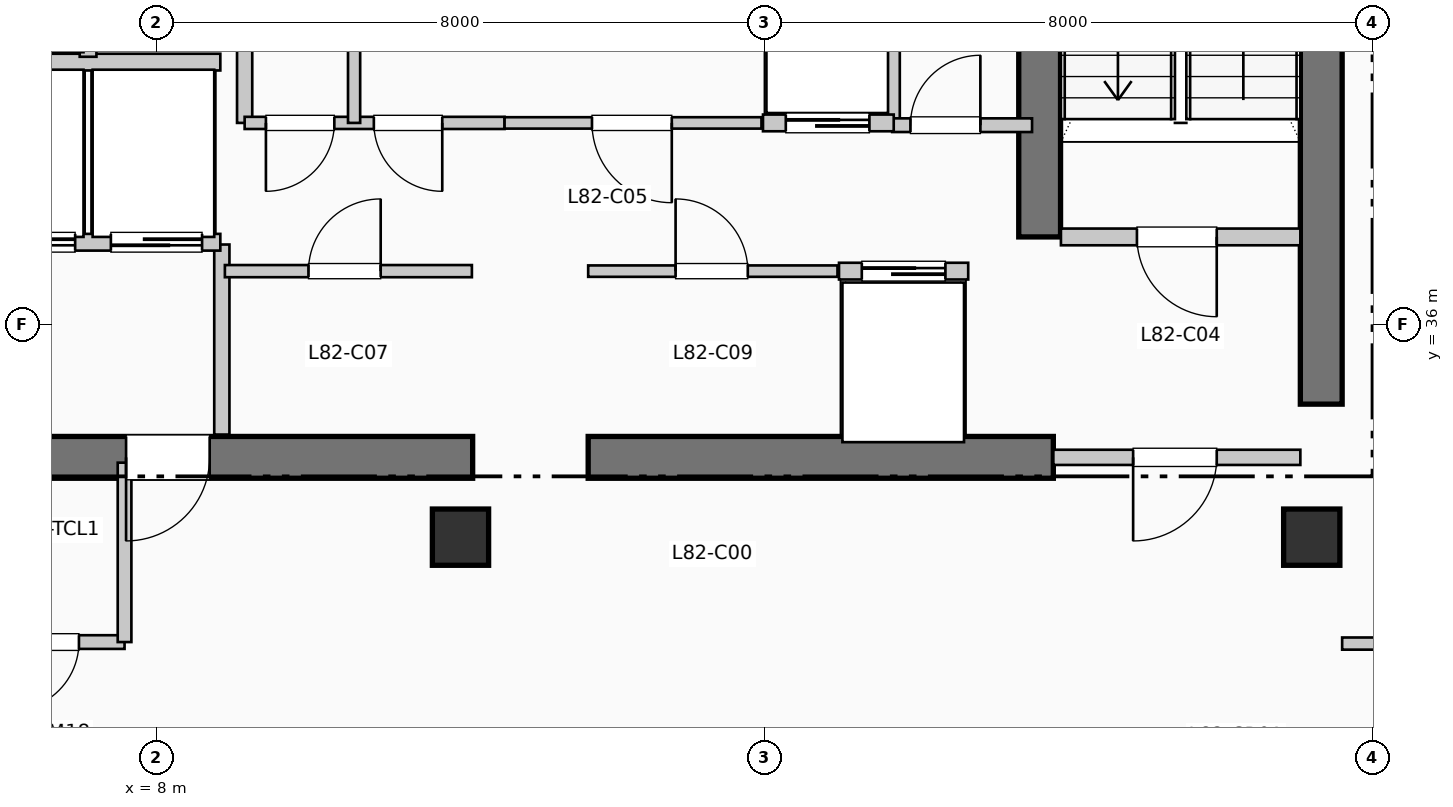
"""IFC4 building model, lengths in metres.
Left out: names, types, materials, properties, quantities, classifications, styles, units other than length and angle.
Written with IfcOpenShell. Run it as: python <this file> out.ifc"""

import sys

from ifc_helpers import new_model, si_unit, direction, frame, frame_2d, origin, origin_2d, place, context, subcontext, project, spatial, rectangle, extrude, element, fill, save


model = new_model("IFC4")
c1 = context("Model", 3, precision=1e-05, world=origin(), true_north=direction((0.0, 1.0)))
c2 = subcontext(c1, "Body", "Model", "MODEL_VIEW")
j1 = project(units=[si_unit("LENGTHUNIT", "METRE"), si_unit("PLANEANGLEUNIT", "RADIAN")], contexts=[c1])
p1 = place(None, origin())
s1 = spatial("IfcSite", under=j1, at=p1, CompositionType="ELEMENT")
p2 = place(p1, origin())
s2 = spatial("IfcBuilding", under=s1, at=p2, CompositionType="ELEMENT")
p3 = place(p2, frame((0.0, 0.0, 335.61)))
s3 = spatial("IfcBuildingStorey", under=s2, at=p3, CompositionType="ELEMENT", Elevation=335.61)
p4 = place(p3, frame((23.325, 34.95, 0.0), z_axis=(0.0, 0.0, 1.0), x_axis=(0.0, 1.0, 0.0)))
e1 = element("IfcWall", 1, at=p4, inside=s3, PredefinedType="SHEAR", context=c2, shape_type="SweptSolid", body=[
    extrude(rectangle(XDim=10.64, YDim=0.55, at=frame_2d((5.32, 0.0))), origin(), (0.0, 0.0, 1.0), 3.96),
])
p5 = place(p3, frame((1.45, 34.25, 0.0), z_axis=(0.0, 0.0, 1.0), x_axis=(1.0, 0.0, 0.0)))
e2 = element("IfcWall", 2, at=p5, inside=s3, PredefinedType="SHEAR", context=c2, shape_type="SweptSolid", body=[
    extrude(rectangle(XDim=10.71, YDim=0.55, at=frame_2d((5.355, 0.0))), origin(), (0.0, 0.0, 1.0), 3.96),
])
p6 = place(p5, frame((7.25, 0.0, 0.0), z_axis=(0.0, 0.0, 1.0), x_axis=(-1.0, 0.0, 0.0)))
e3 = element("IfcOpeningElement", 3, at=p6, cuts=e2, PredefinedType="OPENING", context=c2, shape_type="SweptSolid", body=[
    extrude(rectangle(XDim=1.1, YDim=2.15, at=frame_2d((0.55, 1.075))), frame((0.0, 0.285, 0.0), z_axis=(0.0, -1.0, 0.0), x_axis=(1.0, 0.0, 0.0)), (0.0, 0.0, 1.0), 0.57),
])
p7 = place(p3, frame((13.68, 34.25, 0.0), z_axis=(0.0, 0.0, 1.0), x_axis=(1.0, 0.0, 0.0)))
e4 = element("IfcWall", 4, at=p7, inside=s3, PredefinedType="SHEAR", context=c2, shape_type="SweptSolid", body=[
    extrude(rectangle(XDim=6.12, YDim=0.55, at=frame_2d((3.06, 0.0))), origin(), (0.0, 0.0, 1.0), 3.96),
])
p8 = place(p3, frame((19.62, 37.15, 0.0), z_axis=(0.0, 0.0, 1.0), x_axis=(0.0, 1.0, 0.0)))
e5 = element("IfcWall", 5, at=p8, inside=s3, PredefinedType="SHEAR", context=c2, shape_type="SweptSolid", body=[
    extrude(rectangle(XDim=7.89, YDim=0.55, at=frame_2d((3.945, 0.0))), origin(), (0.0, 0.0, 1.0), 3.96),
])
for number, where, z_axis, x_axis in (
    (6, (12.0, 33.2, 0.0), (0.0, 0.0, 1.0), (1.0, 0.0, 0.0)),
    (7, (23.2, 33.2, 0.0), (0.0, 0.0, 1.0), (1.0, 0.0, 0.0)),
):
    element("IfcColumn", number, at=place(p3, frame(where, z_axis=z_axis, x_axis=x_axis)), inside=s3, PredefinedType="COLUMN", context=c2, shape_type="SweptSolid", body=[
        extrude(rectangle(XDim=0.74, YDim=0.74, at=origin_2d()), origin(), (0.0, 0.0, 1.0), 3.96),
    ])
p9 = place(p3, frame((8.86, 34.55, 0.0), z_axis=(0.0, 0.0, 1.0), x_axis=(0.0, 1.0, 0.0)))
e8 = element("IfcWall", 8, at=p9, inside=s3, PredefinedType="PARTITIONING", context=c2, shape_type="SweptSolid", body=[
    extrude(rectangle(XDim=2.5, YDim=0.2, at=frame_2d((1.25, 0.0))), origin(), (0.0, 0.0, 1.0), 3.74),
])
p10 = place(p3, frame((19.9, 37.15, 0.0), z_axis=(0.0, 0.0, 1.0), x_axis=(1.0, 0.0, 0.0)))
e9 = element("IfcWall", 9, at=p10, inside=s3, PredefinedType="PARTITIONING", context=c2, shape_type="SweptSolid", body=[
    extrude(rectangle(XDim=3.15, YDim=0.22, at=frame_2d((1.575, 0.0))), origin(), (0.0, 0.0, 1.0), 3.74),
])
p11 = place(p10, frame((2.05, 0.0, 0.0), z_axis=(0.0, 0.0, 1.0), x_axis=(-1.0, 0.0, 0.0)))
e10 = element("IfcOpeningElement", 10, at=p11, cuts=e9, PredefinedType="OPENING", context=c2, shape_type="SweptSolid", body=[
    extrude(rectangle(XDim=1.05, YDim=2.15, at=frame_2d((0.525, 1.075))), frame((0.0, 0.12, 0.0), z_axis=(0.0, -1.0, 0.0), x_axis=(1.0, 0.0, 0.0)), (0.0, 0.0, 1.0), 0.24),
])
p12 = place(p3, frame((19.8, 34.25, 0.0), z_axis=(0.0, 0.0, 1.0), x_axis=(1.0, 0.0, 0.0)))
e11 = element("IfcWall", 11, at=p12, inside=s3, PredefinedType="PARTITIONING", context=c2, shape_type="SweptSolid", body=[
    extrude(rectangle(XDim=3.25, YDim=0.2, at=frame_2d((1.625, 0.0))), origin(), (0.0, 0.0, 1.0), 3.74),
])
p13 = place(p12, frame((2.15, 0.0, 0.0), z_axis=(0.0, 0.0, 1.0), x_axis=(-1.0, 0.0, 0.0)))
e12 = element("IfcOpeningElement", 12, at=p13, cuts=e11, PredefinedType="OPENING", context=c2, shape_type="SweptSolid", body=[
    extrude(rectangle(XDim=1.1, YDim=2.15, at=frame_2d((0.55, 1.075))), frame((0.0, 0.11, 0.0), z_axis=(0.0, -1.0, 0.0), x_axis=(1.0, 0.0, 0.0)), (0.0, 0.0, 1.0), 0.22),
])
p14 = place(p3, frame((5.38, 37.08, 0.0), z_axis=(0.0, 0.0, 1.0), x_axis=(1.0, 0.0, 0.0)))
e13 = element("IfcWall", 13, at=p14, inside=s3, PredefinedType="PARTITIONING", context=c2, shape_type="SweptSolid", body=[
    extrude(rectangle(XDim=3.46, YDim=0.22, at=frame_2d((1.73, 0.0))), origin(), (0.0, 0.0, 1.0), 3.74),
])
p15 = place(p14, frame((1.55, 0.0, 0.0), z_axis=(0.0, 0.0, 1.0), x_axis=(-1.0, 0.0, 0.0)))
e14 = element("IfcOpeningElement", 14, at=p15, cuts=e13, PredefinedType="OPENING", context=c2, shape_type="SweptSolid", body=[
    extrude(rectangle(XDim=1.2, YDim=2.2, at=frame_2d((0.6, 1.1))), frame((0.0, 0.12, 0.0), z_axis=(0.0, -1.0, 0.0), x_axis=(1.0, 0.0, 0.0)), (0.0, 0.0, 1.0), 0.24),
])
p16 = place(p14, frame((3.22, 0.0, 0.0), z_axis=(0.0, 0.0, 1.0), x_axis=(-1.0, 0.0, 0.0)))
e15 = element("IfcOpeningElement", 15, at=p16, cuts=e13, PredefinedType="OPENING", context=c2, shape_type="SweptSolid", body=[
    extrude(rectangle(XDim=1.2, YDim=2.2, at=frame_2d((0.6, 1.1))), frame((0.0, 0.12, 0.0), z_axis=(0.0, -1.0, 0.0), x_axis=(1.0, 0.0, 0.0)), (0.0, 0.0, 1.0), 0.24),
])
p17 = place(p3, frame((5.38, 39.45, 0.0), z_axis=(0.0, 0.0, 1.0), x_axis=(1.0, 0.0, 0.0)))
e16 = element("IfcWall", 16, at=p17, inside=s3, PredefinedType="PARTITIONING", context=c2, shape_type="SweptSolid", body=[
    extrude(rectangle(XDim=3.46, YDim=0.22, at=frame_2d((1.73, 0.0))), origin(), (0.0, 0.0, 1.0), 3.74),
])
p18 = place(p3, frame((7.1, 39.52, 0.0), z_axis=(0.0, 0.0, 1.0), x_axis=(0.0, 1.0, 0.0)))
e17 = element("IfcWall", 17, at=p18, inside=s3, PredefinedType="PARTITIONING", context=c2, shape_type="SweptSolid", body=[
    extrude(rectangle(XDim=2.93, YDim=0.22, at=frame_2d((1.465, 0.0))), origin(), (0.0, 0.0, 1.0), 3.74),
])
p19 = place(p18, frame((0.85, 0.0, 0.0)))
e18 = element("IfcOpeningElement", 18, at=p19, cuts=e17, PredefinedType="OPENING", context=c2, shape_type="SweptSolid", body=[
    extrude(rectangle(XDim=1.1, YDim=2.2, at=frame_2d((0.55, 1.1))), frame((0.0, 0.12, 0.0), z_axis=(0.0, -1.0, 0.0), x_axis=(1.0, 0.0, 0.0)), (0.0, 0.0, 1.0), 0.24),
])
for number, where, z_axis, x_axis in (
    (19, (9.16, 38.65, 0.0), (0.0, 0.0, 1.0), (0.0, 1.0, 0.0)),
    (20, (17.68, 38.65, 0.0), (0.0, 0.0, 1.0), (0.0, 1.0, 0.0)),
):
    element("IfcWall", number, at=place(p3, frame(where, z_axis=z_axis, x_axis=x_axis)), inside=s3, PredefinedType="PARTITIONING", context=c2, shape_type="SweptSolid", body=[
        extrude(rectangle(XDim=2.35, YDim=0.2, at=frame_2d((1.175, 0.0))), origin(), (0.0, 0.0, 1.0), 3.74),
    ])
p20 = place(p3, frame((17.68, 38.62, 0.0), z_axis=(0.0, 0.0, 1.0), x_axis=(1.0, 0.0, 0.0)))
e21 = element("IfcWall", 21, at=p20, inside=s3, PredefinedType="PARTITIONING", context=c2, shape_type="SweptSolid", body=[
    extrude(rectangle(XDim=1.84, YDim=0.18, at=frame_2d((0.92, 0.0))), origin(), (0.0, 0.0, 1.0), 3.74),
])
p21 = place(p20, frame((0.24, 0.0, 0.0)))
e22 = element("IfcOpeningElement", 22, at=p21, cuts=e21, PredefinedType="OPENING", context=c2, shape_type="SweptSolid", body=[
    extrude(rectangle(XDim=0.92, YDim=2.1, at=frame_2d((0.46, 1.05))), frame((0.0, 0.1, 0.0), z_axis=(0.0, -1.0, 0.0), x_axis=(1.0, 0.0, 0.0)), (0.0, 0.0, 1.0), 0.2),
])
p22 = place(p3, frame((5.5, 31.82, 0.0), z_axis=(0.0, 0.0, 1.0), x_axis=(1.0, 0.0, 0.0)))
e23 = element("IfcWall", 23, at=p22, inside=s3, PredefinedType="PLUMBINGWALL", context=c2, shape_type="SweptSolid", body=[
    extrude(rectangle(XDim=2.08, YDim=0.18, at=frame_2d((1.04, 0.0))), origin(), (0.0, 0.0, 1.0), 3.74),
])
p23 = place(p22, frame((1.48, 0.0, 0.0), z_axis=(0.0, 0.0, 1.0), x_axis=(-1.0, 0.0, 0.0)))
e24 = element("IfcOpeningElement", 24, at=p23, cuts=e23, PredefinedType="OPENING", context=c2, shape_type="SweptSolid", body=[
    extrude(rectangle(XDim=0.9, YDim=2.1, at=frame_2d((0.45, 1.05))), frame((0.0, 0.1, 0.0), z_axis=(0.0, -1.0, 0.0), x_axis=(1.0, 0.0, 0.0)), (0.0, 0.0, 1.0), 0.2),
])
p24 = place(p3, frame((7.58, 31.82, 0.0), z_axis=(0.0, 0.0, 1.0), x_axis=(0.0, 1.0, 0.0)))
e25 = element("IfcWall", 25, at=p24, inside=s3, PredefinedType="PLUMBINGWALL", context=c2, shape_type="SweptSolid", body=[
    extrude(rectangle(XDim=2.36, YDim=0.18, at=frame_2d((1.18, 0.0))), origin(), (0.0, 0.0, 1.0), 3.74),
])
p25 = place(p3, frame((8.9, 36.7, 0.0), z_axis=(0.0, 0.0, 1.0), x_axis=(1.0, 0.0, 0.0)))
e26 = element("IfcWall", 26, at=p25, inside=s3, PredefinedType="PARTITIONING", context=c2, shape_type="SweptSolid", body=[
    extrude(rectangle(XDim=3.25, YDim=0.16, at=frame_2d((1.625, 0.0))), origin(), (0.0, 0.0, 1.0), 3.74),
])
p26 = place(p25, frame((1.1, 0.0, 0.0)))
e27 = element("IfcOpeningElement", 27, at=p26, cuts=e26, PredefinedType="OPENING", context=c2, shape_type="SweptSolid", body=[
    extrude(rectangle(XDim=0.95, YDim=2.15, at=frame_2d((0.475, 1.075))), frame((0.0, 0.09, 0.0), z_axis=(0.0, -1.0, 0.0), x_axis=(1.0, 0.0, 0.0)), (0.0, 0.0, 1.0), 0.18),
])
p27 = place(p3, frame((9.16, 38.65, 0.0), z_axis=(0.0, 0.0, 1.0), x_axis=(1.0, 0.0, 0.0)))
e28 = element("IfcWall", 28, at=p27, inside=s3, PredefinedType="PARTITIONING", context=c2, shape_type="SweptSolid", body=[
    extrude(rectangle(XDim=3.42, YDim=0.16, at=frame_2d((1.71, 0.0))), origin(), (0.0, 0.0, 1.0), 3.74),
])
p28 = place(p27, frame((1.18, 0.0, 0.0), z_axis=(0.0, 0.0, 1.0), x_axis=(-1.0, 0.0, 0.0)))
e29 = element("IfcOpeningElement", 29, at=p28, cuts=e28, PredefinedType="OPENING", context=c2, shape_type="SweptSolid", body=[
    extrude(rectangle(XDim=0.9, YDim=2.15, at=frame_2d((0.45, 1.075))), frame((0.0, 0.09, 0.0), z_axis=(0.0, -1.0, 0.0), x_axis=(1.0, 0.0, 0.0)), (0.0, 0.0, 1.0), 0.18),
])
p29 = place(p27, frame((2.6, 0.0, 0.0), z_axis=(0.0, 0.0, 1.0), x_axis=(-1.0, 0.0, 0.0)))
e30 = element("IfcOpeningElement", 30, at=p29, cuts=e28, PredefinedType="OPENING", context=c2, shape_type="SweptSolid", body=[
    extrude(rectangle(XDim=0.9, YDim=2.15, at=frame_2d((0.45, 1.075))), frame((0.0, 0.09, 0.0), z_axis=(0.0, -1.0, 0.0), x_axis=(1.0, 0.0, 0.0)), (0.0, 0.0, 1.0), 0.18),
])
p30 = place(p3, frame((10.6, 38.65, 0.0), z_axis=(0.0, 0.0, 1.0), x_axis=(0.0, 1.0, 0.0)))
e31 = element("IfcWall", 31, at=p30, inside=s3, PredefinedType="PARTITIONING", context=c2, shape_type="SweptSolid", body=[
    extrude(rectangle(XDim=2.35, YDim=0.16, at=frame_2d((1.175, 0.0))), origin(), (0.0, 0.0, 1.0), 3.74),
])
p31 = place(p3, frame((13.68, 36.7, 0.0), z_axis=(0.0, 0.0, 1.0), x_axis=(1.0, 0.0, 0.0)))
e32 = element("IfcWall", 32, at=p31, inside=s3, PredefinedType="PARTITIONING", context=c2, shape_type="SweptSolid", body=[
    extrude(rectangle(XDim=3.28, YDim=0.15, at=frame_2d((1.64, 0.0))), origin(), (0.0, 0.0, 1.0), 3.74),
])
p32 = place(p31, frame((1.15, 0.0, 0.0)))
e33 = element("IfcOpeningElement", 33, at=p32, cuts=e32, PredefinedType="OPENING", context=c2, shape_type="SweptSolid", body=[
    extrude(rectangle(XDim=0.95, YDim=2.15, at=frame_2d((0.475, 1.075))), frame((0.0, 0.085, 0.0), z_axis=(0.0, -1.0, 0.0), x_axis=(1.0, 0.0, 0.0)), (0.0, 0.0, 1.0), 0.17),
])
p33 = place(p3, frame((12.58, 38.65, 0.0), z_axis=(0.0, 0.0, 1.0), x_axis=(1.0, 0.0, 0.0)))
e34 = element("IfcWall", 34, at=p33, inside=s3, PredefinedType="PARTITIONING", context=c2, shape_type="SweptSolid", body=[
    extrude(rectangle(XDim=3.38, YDim=0.15, at=frame_2d((1.69, 0.0))), origin(), (0.0, 0.0, 1.0), 3.74),
])
p34 = place(p33, frame((2.2, 0.0, 0.0), z_axis=(0.0, 0.0, 1.0), x_axis=(-1.0, 0.0, 0.0)))
e35 = element("IfcOpeningElement", 35, at=p34, cuts=e34, PredefinedType="OPENING", context=c2, shape_type="SweptSolid", body=[
    extrude(rectangle(XDim=1.05, YDim=2.15, at=frame_2d((0.525, 1.075))), frame((0.0, 0.085, 0.0), z_axis=(0.0, -1.0, 0.0), x_axis=(1.0, 0.0, 0.0)), (0.0, 0.0, 1.0), 0.17),
])
p35 = place(p3, frame((16.98, 36.7, 0.0), z_axis=(0.0, 0.0, 1.0), x_axis=(1.0, 0.0, 0.0)))
e36 = element("IfcWall", 36, at=p35, inside=s3, PredefinedType="PARTITIONING", context=c2, shape_type="SweptSolid", body=[
    extrude(rectangle(XDim=1.7, YDim=0.22, at=frame_2d((0.85, 0.0))), origin(), (0.0, 0.0, 1.0), 3.74),
])
p36 = place(p35, frame((0.3, 0.0, 0.0)))
e37 = element("IfcOpeningElement", 37, at=p36, cuts=e36, PredefinedType="OPENING", context=c2, shape_type="SweptSolid", body=[
    extrude(rectangle(XDim=1.1, YDim=2.2, at=frame_2d((0.55, 1.1))), frame((0.0, 0.12, 0.0), z_axis=(0.0, -1.0, 0.0), x_axis=(1.0, 0.0, 0.0)), (0.0, 0.0, 1.0), 0.24),
])
p37 = place(p3, frame((15.98, 38.65, 0.0), z_axis=(0.0, 0.0, 1.0), x_axis=(1.0, 0.0, 0.0)))
e38 = element("IfcWall", 38, at=p37, inside=s3, PredefinedType="PARTITIONING", context=c2, shape_type="SweptSolid", body=[
    extrude(rectangle(XDim=1.72, YDim=0.22, at=frame_2d((0.86, 0.0))), origin(), (0.0, 0.0, 1.0), 3.74),
])
p38 = place(p37, frame((0.3, 0.0, 0.0)))
e39 = element("IfcOpeningElement", 39, at=p38, cuts=e38, PredefinedType="OPENING", context=c2, shape_type="SweptSolid", body=[
    extrude(rectangle(XDim=1.1, YDim=2.2, at=frame_2d((0.55, 1.1))), frame((0.0, 0.12, 0.0), z_axis=(0.0, -1.0, 0.0), x_axis=(1.0, 0.0, 0.0)), (0.0, 0.0, 1.0), 0.24),
])
p39 = place(p3, frame((23.6, 31.8, 0.0), z_axis=(0.0, 0.0, 1.0), x_axis=(1.0, 0.0, 0.0)))
e40 = element("IfcWall", 40, at=p39, inside=s3, PredefinedType="PARTITIONING", context=c2, shape_type="SweptSolid", body=[
    extrude(rectangle(XDim=20.61, YDim=0.16, at=frame_2d((10.305, 0.0))), origin(), (0.0, 0.0, 1.0), 3.74),
])
p40 = place(p39, frame((9.83, 0.0, 0.0)))
e41 = element("IfcOpeningElement", 41, at=p40, cuts=e40, PredefinedType="OPENING", context=c2, shape_type="SweptSolid", body=[
    extrude(rectangle(XDim=0.95, YDim=2.15, at=frame_2d((0.475, 1.075))), frame((0.0, 0.09, 0.0), z_axis=(0.0, -1.0, 0.0), x_axis=(1.0, 0.0, 0.0)), (0.0, 0.0, 1.0), 0.18),
])
p41 = place(p6, origin())
e42 = element("IfcDoor", 42, at=p41, inside=s3, OperationType="SINGLE_SWING_LEFT", PredefinedType="DOOR", context=c2, shape_type="SweptSolid", body=[
    extrude(rectangle(XDim=1.1, YDim=2.15, at=frame_2d((0.55, 1.075))), frame((0.0, 0.025, 0.0), z_axis=(0.0, -1.0, 0.0), x_axis=(1.0, 0.0, 0.0)), (0.0, 0.0, 1.0), 0.05),
])
fill(e3, e42)
p42 = place(p11, origin())
e43 = element("IfcDoor", 43, at=p42, inside=s3, OperationType="SINGLE_SWING_RIGHT", PredefinedType="DOOR", context=c2, shape_type="SweptSolid", body=[
    extrude(rectangle(XDim=1.05, YDim=2.15, at=frame_2d((0.525, 1.075))), frame((0.0, 0.025, 0.0), z_axis=(0.0, -1.0, 0.0), x_axis=(1.0, 0.0, 0.0)), (0.0, 0.0, 1.0), 0.05),
])
fill(e10, e43)
p43 = place(p13, origin())
e44 = element("IfcDoor", 44, at=p43, inside=s3, OperationType="SINGLE_SWING_LEFT", PredefinedType="DOOR", context=c2, shape_type="SweptSolid", body=[
    extrude(rectangle(XDim=1.1, YDim=2.15, at=frame_2d((0.55, 1.075))), frame((0.0, 0.025, 0.0), z_axis=(0.0, -1.0, 0.0), x_axis=(1.0, 0.0, 0.0)), (0.0, 0.0, 1.0), 0.05),
])
fill(e12, e44)
p44 = place(p15, origin())
e45 = element("IfcDoor", 45, at=p44, inside=s3, OperationType="SLIDING_TO_RIGHT", PredefinedType="DOOR", context=c2, shape_type="SweptSolid", body=[
    extrude(rectangle(XDim=1.2, YDim=2.2, at=frame_2d((0.6, 1.1))), frame((0.0, 0.025, 0.0), z_axis=(0.0, -1.0, 0.0), x_axis=(1.0, 0.0, 0.0)), (0.0, 0.0, 1.0), 0.05),
])
fill(e14, e45)
p45 = place(p16, origin())
e46 = element("IfcDoor", 46, at=p45, inside=s3, OperationType="SLIDING_TO_RIGHT", PredefinedType="DOOR", context=c2, shape_type="SweptSolid", body=[
    extrude(rectangle(XDim=1.2, YDim=2.2, at=frame_2d((0.6, 1.1))), frame((0.0, 0.025, 0.0), z_axis=(0.0, -1.0, 0.0), x_axis=(1.0, 0.0, 0.0)), (0.0, 0.0, 1.0), 0.05),
])
fill(e15, e46)
p46 = place(p21, origin())
e47 = element("IfcDoor", 47, at=p46, inside=s3, OperationType="SINGLE_SWING_RIGHT", PredefinedType="DOOR", context=c2, shape_type="SweptSolid", body=[
    extrude(rectangle(XDim=0.92, YDim=2.1, at=frame_2d((0.46, 1.05))), frame((0.0, 0.025, 0.0), z_axis=(0.0, -1.0, 0.0), x_axis=(1.0, 0.0, 0.0)), (0.0, 0.0, 1.0), 0.05),
])
fill(e22, e47)
p47 = place(p23, origin())
e48 = element("IfcDoor", 48, at=p47, inside=s3, OperationType="SINGLE_SWING_LEFT", PredefinedType="DOOR", context=c2, shape_type="SweptSolid", body=[
    extrude(rectangle(XDim=0.9, YDim=2.1, at=frame_2d((0.45, 1.05))), frame((0.0, 0.025, 0.0), z_axis=(0.0, -1.0, 0.0), x_axis=(1.0, 0.0, 0.0)), (0.0, 0.0, 1.0), 0.05),
])
fill(e24, e48)
p48 = place(p26, origin())
e49 = element("IfcDoor", 49, at=p48, inside=s3, OperationType="SINGLE_SWING_RIGHT", PredefinedType="DOOR", context=c2, shape_type="SweptSolid", body=[
    extrude(rectangle(XDim=0.95, YDim=2.15, at=frame_2d((0.475, 1.075))), frame((0.0, 0.025, 0.0), z_axis=(0.0, -1.0, 0.0), x_axis=(1.0, 0.0, 0.0)), (0.0, 0.0, 1.0), 0.05),
])
fill(e27, e49)
p49 = place(p28, origin())
e50 = element("IfcDoor", 50, at=p49, inside=s3, OperationType="SINGLE_SWING_LEFT", PredefinedType="DOOR", context=c2, shape_type="SweptSolid", body=[
    extrude(rectangle(XDim=0.9, YDim=2.15, at=frame_2d((0.45, 1.075))), frame((0.0, 0.025, 0.0), z_axis=(0.0, -1.0, 0.0), x_axis=(1.0, 0.0, 0.0)), (0.0, 0.0, 1.0), 0.05),
])
fill(e29, e50)
p50 = place(p29, origin())
e51 = element("IfcDoor", 51, at=p50, inside=s3, OperationType="SINGLE_SWING_RIGHT", PredefinedType="DOOR", context=c2, shape_type="SweptSolid", body=[
    extrude(rectangle(XDim=0.9, YDim=2.15, at=frame_2d((0.45, 1.075))), frame((0.0, 0.025, 0.0), z_axis=(0.0, -1.0, 0.0), x_axis=(1.0, 0.0, 0.0)), (0.0, 0.0, 1.0), 0.05),
])
fill(e30, e51)
p51 = place(p32, origin())
e52 = element("IfcDoor", 52, at=p51, inside=s3, OperationType="SINGLE_SWING_LEFT", PredefinedType="DOOR", context=c2, shape_type="SweptSolid", body=[
    extrude(rectangle(XDim=0.95, YDim=2.15, at=frame_2d((0.475, 1.075))), frame((0.0, 0.025, 0.0), z_axis=(0.0, -1.0, 0.0), x_axis=(1.0, 0.0, 0.0)), (0.0, 0.0, 1.0), 0.05),
])
fill(e33, e52)
p52 = place(p34, origin())
e53 = element("IfcDoor", 53, at=p52, inside=s3, OperationType="SINGLE_SWING_RIGHT", PredefinedType="DOOR", context=c2, shape_type="SweptSolid", body=[
    extrude(rectangle(XDim=1.05, YDim=2.15, at=frame_2d((0.525, 1.075))), frame((0.0, 0.025, 0.0), z_axis=(0.0, -1.0, 0.0), x_axis=(1.0, 0.0, 0.0)), (0.0, 0.0, 1.0), 0.05),
])
fill(e35, e53)
p53 = place(p36, origin())
e54 = element("IfcDoor", 54, at=p53, inside=s3, OperationType="SLIDING_TO_LEFT", PredefinedType="DOOR", context=c2, shape_type="SweptSolid", body=[
    extrude(rectangle(XDim=1.1, YDim=2.2, at=frame_2d((0.55, 1.1))), frame((0.0, 0.025, 0.0), z_axis=(0.0, -1.0, 0.0), x_axis=(1.0, 0.0, 0.0)), (0.0, 0.0, 1.0), 0.05),
])
fill(e37, e54)
p54 = place(p38, origin())
e55 = element("IfcDoor", 55, at=p54, inside=s3, OperationType="SLIDING_TO_LEFT", PredefinedType="DOOR", context=c2, shape_type="SweptSolid", body=[
    extrude(rectangle(XDim=1.1, YDim=2.2, at=frame_2d((0.55, 1.1))), frame((0.0, 0.025, 0.0), z_axis=(0.0, -1.0, 0.0), x_axis=(1.0, 0.0, 0.0)), (0.0, 0.0, 1.0), 0.05),
])
fill(e39, e55)
save(model, sys.argv[1])
